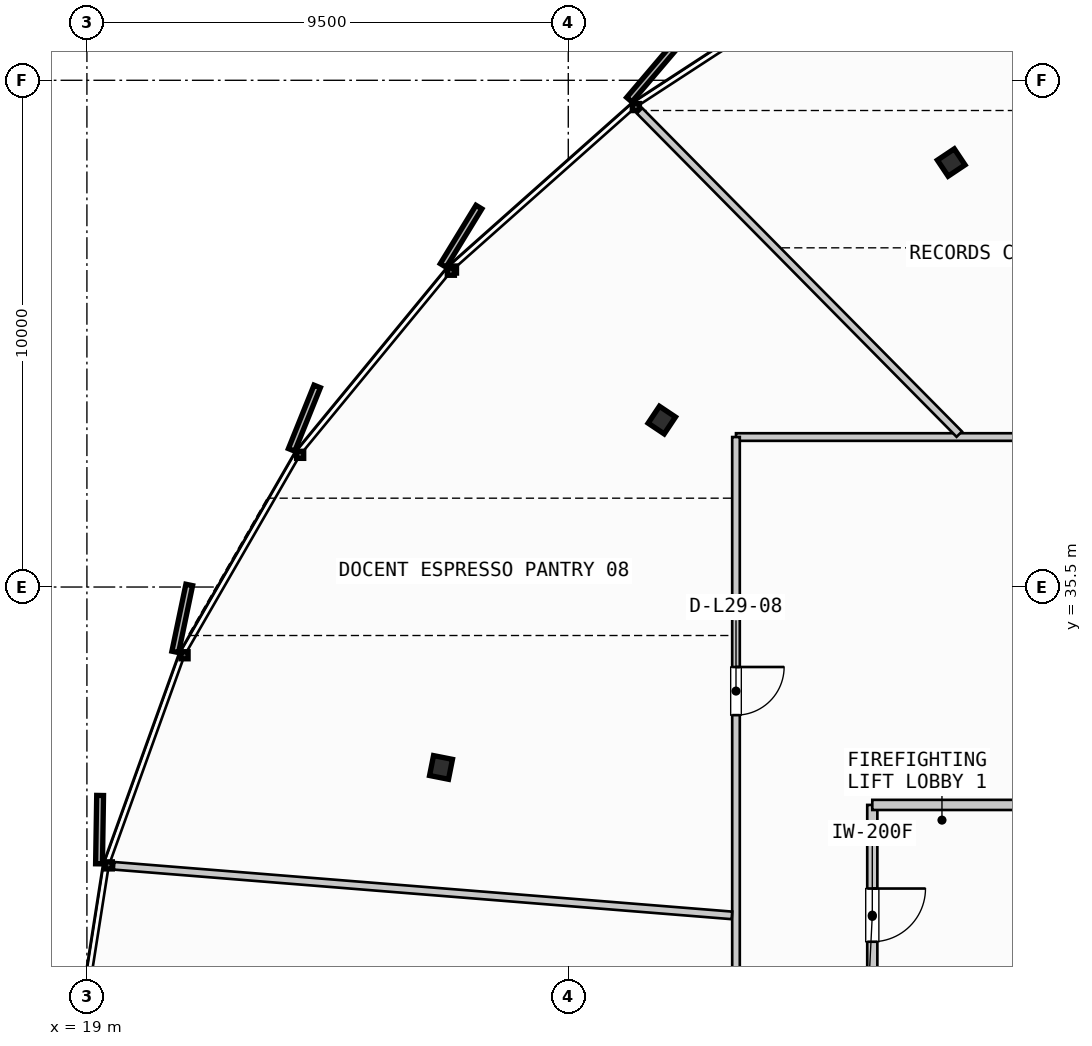
"""IFC4 building model, lengths in metres.
Left out: names, types, materials, properties, quantities, classifications, styles, units other than length and angle.
Written with IfcOpenShell. Run it as: python <this file> out.ifc"""

import sys

from ifc_helpers import new_model, si_unit, direction, frame, frame_2d, origin, origin_2d, place, context, subcontext, project, spatial, rectangle, i_section, extrude, source, transform, mapped, element, fill, save


model = new_model("IFC4")
c1 = context("Model", 3, precision=1e-05, world=origin(), true_north=direction((0.0, 1.0)))
c2 = subcontext(c1, "Body", "Model", "MODEL_VIEW")
j1 = project(units=[si_unit("LENGTHUNIT", "METRE"), si_unit("PLANEANGLEUNIT", "RADIAN")], contexts=[c1])
p1 = place(None, origin())
s1 = spatial("IfcSite", under=j1, at=p1, CompositionType="ELEMENT")
p2 = place(p1, origin())
s2 = spatial("IfcBuilding", under=s1, at=p2, CompositionType="ELEMENT")
p3 = place(p2, frame((0.0, 0.0, 118.0)))
s3 = spatial("IfcBuildingStorey", under=s2, at=p3, CompositionType="ELEMENT", Elevation=118.0)
m1 = source(origin(), c2, "Body", "SweptSolid", [
    extrude(i_section(OverallWidth=0.401, OverallDepth=0.381, WebThickness=0.032, FlangeThickness=0.051, FilletRadius=0.015, at=origin_2d()), origin(), (0.0, 0.0, 1.0), 3.35),
])
for number, where, z_axis, x_axis in (
    (1, (36.058, 43.877, 0.0), (0.0, 0.0, 1.0), (-0.556, 0.831, 0.0)),
    (2, (30.346, 38.794, 0.0), (0.0, 0.0, 1.0), (-0.831, 0.556, 0.0)),
    (3, (25.989, 31.94, 0.0), (0.0, 0.0, 1.0), (-0.981, 0.195, 0.0)),
):
    element("IfcColumn", number, at=place(p3, frame(where, z_axis=z_axis, x_axis=x_axis)), inside=s3, PredefinedType="COLUMN", context=c2, shape_type="MappedRepresentation", body=[
        mapped(m1, transform((0.0, 0.0, 0.0), scale=1.0)),
    ])
p4 = place(p3, frame((34.5, 31.2, 0.0), z_axis=(0.0, 0.0, 1.0), x_axis=(0.0, -1.0, 0.0)))
e4 = element("IfcWall", 4, at=p4, inside=s3, PredefinedType="PARTITIONING", context=c2, shape_type="SweptSolid", body=[
    extrude(rectangle(XDim=4.4, YDim=0.2, at=frame_2d((2.2, 0.0))), origin(), (0.0, 0.0, 1.0), 2.775),
])
p5 = place(p4, frame((1.65, 0.0, 0.0)))
e5 = element("IfcOpeningElement", 5, at=p5, cuts=e4, PredefinedType="OPENING", context=c2, shape_type="SweptSolid", body=[
    extrude(rectangle(XDim=1.05, YDim=2.15, at=frame_2d((0.525, 1.075))), frame((0.0, 0.11, 0.0), z_axis=(0.0, -1.0, 0.0), x_axis=(1.0, 0.0, 0.0)), (0.0, 0.0, 1.0), 0.22),
])
p6 = place(p3, frame((34.5, 31.2, 0.0), z_axis=(0.0, 0.0, 1.0), x_axis=(1.0, 0.0, 0.0)))
e6 = element("IfcWall", 6, at=p6, inside=s3, PredefinedType="PARTITIONING", context=c2, shape_type="SweptSolid", body=[
    extrude(rectangle(XDim=3.215, YDim=0.2, at=frame_2d((1.607, 0.0))), origin(), (0.0, 0.0, 1.0), 2.775),
])
p7 = place(p3, frame((61.79, 38.46, 0.0), z_axis=(0.0, 0.0, 1.0), x_axis=(-1.0, 0.0, 0.0)))
e7 = element("IfcWall", 7, at=p7, inside=s3, PredefinedType="PARTITIONING", context=c2, shape_type="SweptSolid", body=[
    extrude(rectangle(XDim=29.98, YDim=0.15, at=frame_2d((14.99, 0.0))), origin(), (0.0, 0.0, 1.0), 2.775),
])
p8 = place(p7, frame((4.875, 0.0, 0.0)))
e8 = element("IfcOpeningElement", 8, at=p8, cuts=e7, PredefinedType="OPENING", context=c2, shape_type="SweptSolid", body=[
    extrude(rectangle(XDim=0.95, YDim=2.15, at=frame_2d((0.475, 1.075))), frame((0.0, 0.085, 0.0), z_axis=(0.0, -1.0, 0.0), x_axis=(1.0, 0.0, 0.0)), (0.0, 0.0, 1.0), 0.17),
])
p9 = place(p7, frame((14.019, 0.0, 0.0)))
e9 = element("IfcOpeningElement", 9, at=p9, cuts=e7, PredefinedType="OPENING", context=c2, shape_type="SweptSolid", body=[
    extrude(rectangle(XDim=0.95, YDim=2.15, at=frame_2d((0.475, 1.075))), frame((0.0, 0.085, 0.0), z_axis=(0.0, -1.0, 0.0), x_axis=(1.0, 0.0, 0.0)), (0.0, 0.0, 1.0), 0.17),
])
p10 = place(p7, frame((21.85, 0.0, 0.0)))
e10 = element("IfcOpeningElement", 10, at=p10, cuts=e7, PredefinedType="OPENING", context=c2, shape_type="SweptSolid", body=[
    extrude(rectangle(XDim=0.95, YDim=2.15, at=frame_2d((0.475, 1.075))), frame((0.0, 0.085, 0.0), z_axis=(0.0, -1.0, 0.0), x_axis=(1.0, 0.0, 0.0)), (0.0, 0.0, 1.0), 0.17),
])
p11 = place(p3, frame((31.81, 38.46, 0.0), z_axis=(0.0, 0.0, 1.0), x_axis=(0.0, -1.0, 0.0)))
e11 = element("IfcWall", 11, at=p11, inside=s3, PredefinedType="PARTITIONING", context=c2, shape_type="SweptSolid", body=[
    extrude(rectangle(XDim=21.32, YDim=0.15, at=frame_2d((10.66, 0.0))), origin(), (0.0, 0.0, 1.0), 2.775),
])
p12 = place(p11, frame((4.538, 0.0, 0.0)))
e12 = element("IfcOpeningElement", 12, at=p12, cuts=e11, PredefinedType="OPENING", context=c2, shape_type="SweptSolid", body=[
    extrude(rectangle(XDim=0.95, YDim=2.15, at=frame_2d((0.475, 1.075))), frame((0.0, 0.085, 0.0), z_axis=(0.0, -1.0, 0.0), x_axis=(1.0, 0.0, 0.0)), (0.0, 0.0, 1.0), 0.17),
])
p13 = place(p11, frame((14.618, 0.0, 0.0)))
e13 = element("IfcOpeningElement", 13, at=p13, cuts=e11, PredefinedType="OPENING", context=c2, shape_type="SweptSolid", body=[
    extrude(rectangle(XDim=0.95, YDim=2.15, at=frame_2d((0.475, 1.075))), frame((0.0, 0.085, 0.0), z_axis=(0.0, -1.0, 0.0), x_axis=(1.0, 0.0, 0.0)), (0.0, 0.0, 1.0), 0.17),
])
p14 = place(p3, frame((36.217, 38.517, 0.0), z_axis=(0.0, 0.0, 1.0), x_axis=(-0.703123175396, 0.711068070033, 0.0)))
e14 = element("IfcWall", 14, at=p14, inside=s3, PredefinedType="PARTITIONING", context=c2, shape_type="SweptSolid", body=[
    extrude(rectangle(XDim=8.973, YDim=0.15, at=frame_2d((4.486, 0.0))), origin(), (0.0, 0.0, 1.0), 2.775),
])
p15 = place(p3, frame((31.73, 29.02, 0.0), z_axis=(0.0, 0.0, 1.0), x_axis=(-0.99679742231, 0.079968111622, 0.0)))
e15 = element("IfcWall", 15, at=p15, inside=s3, PredefinedType="PARTITIONING", context=c2, shape_type="SweptSolid", body=[
    extrude(rectangle(XDim=12.233, YDim=0.15, at=frame_2d((6.117, 0.0))), origin(), (0.0, 0.0, 1.0), 2.775),
])
m2 = source(origin(), c2, "Body", "SweptSolid", [
    extrude(rectangle(XDim=1.05, YDim=2.15, at=frame_2d((0.525, 1.075))), frame((0.0, 0.025, 0.0), z_axis=(0.0, -1.0, 0.0), x_axis=(1.0, 0.0, 0.0)), (0.0, 0.0, 1.0), 0.05),
])
p16 = place(p5, origin())
e16 = element("IfcDoor", 16, at=p16, inside=s3, OperationType="SINGLE_SWING_LEFT", PredefinedType="DOOR", context=c2, shape_type="MappedRepresentation", body=[
    mapped(m2, transform((0.0, 0.0, 0.0), scale=1.0)),
])
fill(e5, e16)
m3 = source(origin(), c2, "Body", "SweptSolid", [
    extrude(rectangle(XDim=0.95, YDim=2.15, at=frame_2d((0.475, 1.075))), frame((0.0, 0.025, 0.0), z_axis=(0.0, -1.0, 0.0), x_axis=(1.0, 0.0, 0.0)), (0.0, 0.0, 1.0), 0.05),
])
p17 = place(p12, origin())
e17 = element("IfcDoor", 17, at=p17, inside=s3, OperationType="SINGLE_SWING_LEFT", PredefinedType="DOOR", context=c2, shape_type="MappedRepresentation", body=[
    mapped(m3, transform((0.0, 0.0, 0.0), scale=1.0)),
])
fill(e12, e17)
save(model, sys.argv[1])
